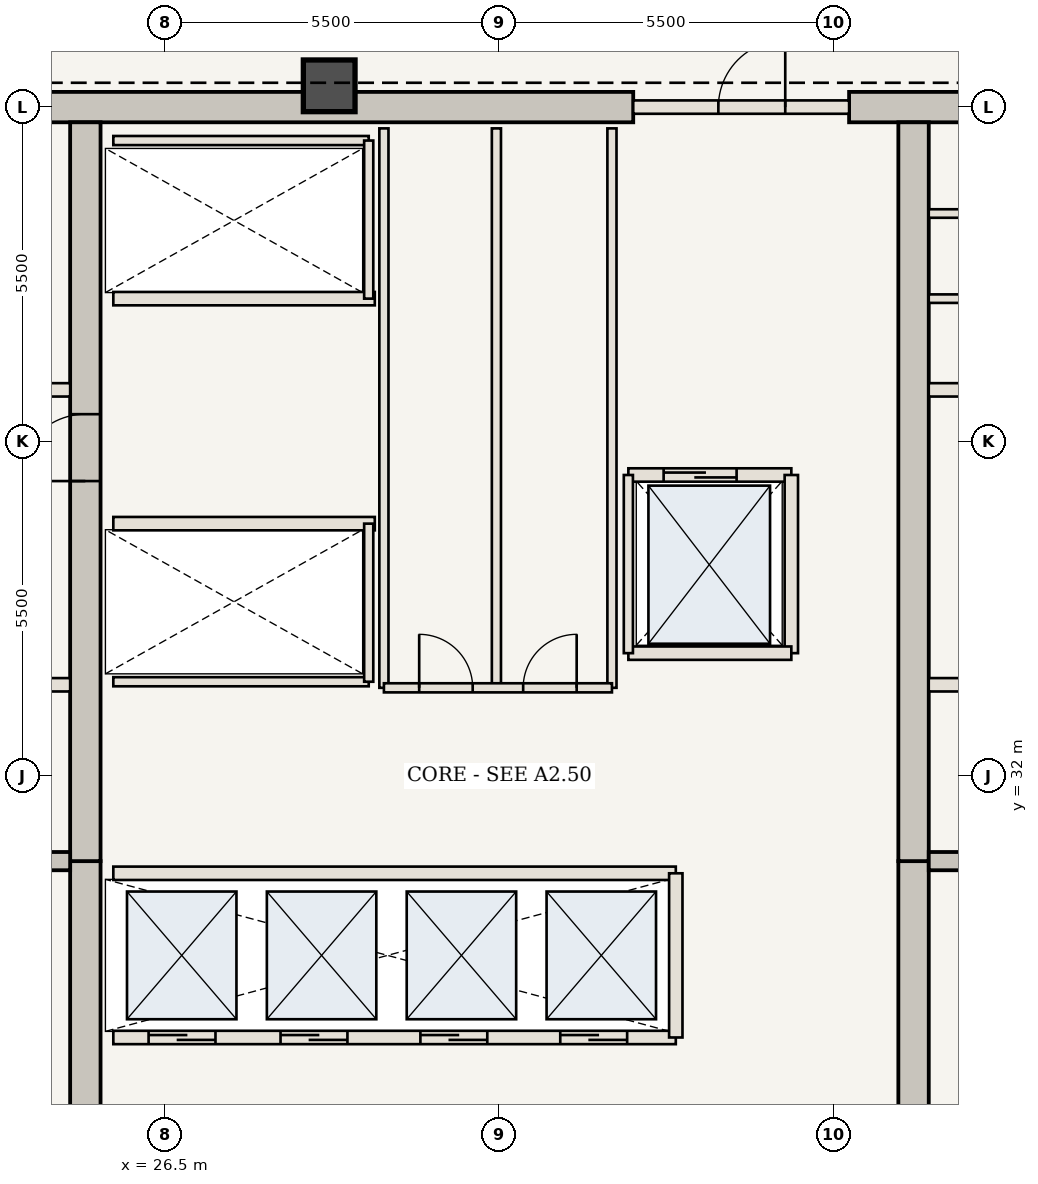
"""IFC4 building model, lengths in metres.
Left out: names, types, materials, properties, quantities, classifications, styles, units other than length and angle.
Written with IfcOpenShell. Run it as: python <this file> out.ifc"""

import sys

from ifc_helpers import new_model, si_unit, direction, frame, frame_2d, origin, origin_2d, place, context, subcontext, project, spatial, rectangle, extrude, element, fill, save


model = new_model("IFC4")
c1 = context("Model", 3, precision=1e-05, world=origin(), true_north=direction((0.0, 1.0)))
c2 = subcontext(c1, "Body", "Model", "MODEL_VIEW")
j1 = project(units=[si_unit("LENGTHUNIT", "METRE"), si_unit("PLANEANGLEUNIT", "RADIAN")], contexts=[c1])
p1 = place(None, origin())
s1 = spatial("IfcSite", under=j1, at=p1, CompositionType="ELEMENT")
p2 = place(p1, origin())
s2 = spatial("IfcBuilding", under=s1, at=p2, CompositionType="ELEMENT")
p3 = place(p2, frame((0.0, 0.0, 229.25)))
s3 = spatial("IfcBuildingStorey", under=s2, at=p3, CompositionType="ELEMENT", Elevation=229.25)
p4 = place(p3, frame((21.41, 43.0, 0.0), z_axis=(0.0, 0.0, 1.0), x_axis=(1.0, 0.0, 0.0)))
e1 = element("IfcWall", 1, at=p4, inside=s3, PredefinedType="SHEAR", context=c2, shape_type="SweptSolid", body=[
    extrude(rectangle(XDim=12.79, YDim=0.5, at=frame_2d((6.395, 0.0))), origin(), (0.0, 0.0, 1.0), 3.85),
])
p5 = place(p3, frame((37.75, 43.0, 0.0), z_axis=(0.0, 0.0, 1.0), x_axis=(1.0, 0.0, 0.0)))
e2 = element("IfcWall", 2, at=p5, inside=s3, PredefinedType="SHEAR", context=c2, shape_type="SweptSolid", body=[
    extrude(rectangle(XDim=4.84, YDim=0.5, at=frame_2d((2.42, 0.0))), origin(), (0.0, 0.0, 1.0), 3.85),
])
p6 = place(p3, frame((25.19, 21.2, 0.0), z_axis=(0.0, 0.0, 1.0), x_axis=(0.0, 1.0, 0.0)))
e3 = element("IfcWall", 3, at=p6, inside=s3, PredefinedType="SHEAR", context=c2, shape_type="SweptSolid", body=[
    extrude(rectangle(XDim=9.4, YDim=0.5, at=frame_2d((4.7, 0.0))), origin(), (0.0, 0.0, 1.0), 3.85),
])
p7 = place(p3, frame((25.19, 30.6, 0.0), z_axis=(0.0, 0.0, 1.0), x_axis=(0.0, 1.0, 0.0)))
e4 = element("IfcWall", 4, at=p7, inside=s3, PredefinedType="SHEAR", context=c2, shape_type="SweptSolid", body=[
    extrude(rectangle(XDim=12.15, YDim=0.5, at=frame_2d((6.075, 0.0))), origin(), (0.0, 0.0, 1.0), 3.85),
])
p8 = place(p7, frame((6.25, 0.0, 0.0)))
e5 = element("IfcOpeningElement", 5, at=p8, cuts=e4, PredefinedType="OPENING", context=c2, shape_type="SweptSolid", body=[
    extrude(rectangle(XDim=1.1, YDim=2.15, at=frame_2d((0.55, 1.075))), frame((0.0, 0.26, 0.0), z_axis=(0.0, -1.0, 0.0), x_axis=(1.0, 0.0, 0.0)), (0.0, 0.0, 1.0), 0.52),
])
p9 = place(p3, frame((38.81, 21.2, 0.0), z_axis=(0.0, 0.0, 1.0), x_axis=(0.0, 1.0, 0.0)))
e6 = element("IfcWall", 6, at=p9, inside=s3, PredefinedType="SHEAR", context=c2, shape_type="SweptSolid", body=[
    extrude(rectangle(XDim=9.4, YDim=0.5, at=frame_2d((4.7, 0.0))), origin(), (0.0, 0.0, 1.0), 3.85),
])
p10 = place(p3, frame((38.81, 30.6, 0.0), z_axis=(0.0, 0.0, 1.0), x_axis=(0.0, 1.0, 0.0)))
e7 = element("IfcWall", 7, at=p10, inside=s3, PredefinedType="SHEAR", context=c2, shape_type="SweptSolid", body=[
    extrude(rectangle(XDim=12.15, YDim=0.5, at=frame_2d((6.075, 0.0))), origin(), (0.0, 0.0, 1.0), 3.85),
])
p11 = place(p3, frame((29.2, 43.35, 0.0), z_axis=(0.0, 0.0, 1.0), x_axis=(1.0, 0.0, 0.0)))
e8 = element("IfcColumn", 8, at=p11, inside=s3, PredefinedType="COLUMN", context=c2, shape_type="SweptSolid", body=[
    extrude(rectangle(XDim=0.85, YDim=0.85, at=origin_2d()), origin(), (0.0, 0.0, 1.0), 3.85),
])
for number, where, z_axis, x_axis in (
    (9, (21.41, 30.6, 0.0), (0.0, 0.0, 1.0), (1.0, 0.0, 0.0)),
    (10, (39.06, 30.6, 0.0), (0.0, 0.0, 1.0), (1.0, 0.0, 0.0)),
):
    element("IfcWall", number, at=place(p3, frame(where, z_axis=z_axis, x_axis=x_axis)), inside=s3, PredefinedType="SHEAR", context=c2, shape_type="SweptSolid", body=[
        extrude(rectangle(XDim=3.53, YDim=0.3, at=frame_2d((1.765, 0.0))), origin(), (0.0, 0.0, 1.0), 3.685),
    ])
p12 = place(p3, frame((21.41, 33.5, 0.0), z_axis=(0.0, 0.0, 1.0), x_axis=(1.0, 0.0, 0.0)))
e11 = element("IfcWall", 11, at=p12, inside=s3, PredefinedType="STANDARD", context=c2, shape_type="SweptSolid", body=[
    extrude(rectangle(XDim=3.53, YDim=0.22, at=frame_2d((1.765, 0.0))), origin(), (0.0, 0.0, 1.0), 3.685),
])
p13 = place(p12, frame((0.75, 0.0, 0.0)))
e12 = element("IfcOpeningElement", 12, at=p13, cuts=e11, PredefinedType="OPENING", context=c2, shape_type="SweptSolid", body=[
    extrude(rectangle(XDim=1.2, YDim=2.2, at=frame_2d((0.6, 1.1))), frame((0.0, 0.12, 0.0), z_axis=(0.0, -1.0, 0.0), x_axis=(1.0, 0.0, 0.0)), (0.0, 0.0, 1.0), 0.24),
])
p14 = place(p3, frame((39.06, 33.5, 0.0), z_axis=(0.0, 0.0, 1.0), x_axis=(1.0, 0.0, 0.0)))
e13 = element("IfcWall", 13, at=p14, inside=s3, PredefinedType="STANDARD", context=c2, shape_type="SweptSolid", body=[
    extrude(rectangle(XDim=3.53, YDim=0.22, at=frame_2d((1.765, 0.0))), origin(), (0.0, 0.0, 1.0), 3.685),
])
p15 = place(p14, frame((1.55, 0.0, 0.0)))
e14 = element("IfcOpeningElement", 14, at=p15, cuts=e13, PredefinedType="OPENING", context=c2, shape_type="SweptSolid", body=[
    extrude(rectangle(XDim=1.2, YDim=2.2, at=frame_2d((0.6, 1.1))), frame((0.0, 0.12, 0.0), z_axis=(0.0, -1.0, 0.0), x_axis=(1.0, 0.0, 0.0)), (0.0, 0.0, 1.0), 0.24),
])
for number, where, z_axis, x_axis in (
    (15, (21.41, 38.35, 0.0), (0.0, 0.0, 1.0), (1.0, 0.0, 0.0)),
    (16, (39.06, 38.35, 0.0), (0.0, 0.0, 1.0), (1.0, 0.0, 0.0)),
):
    element("IfcWall", number, at=place(p3, frame(where, z_axis=z_axis, x_axis=x_axis)), inside=s3, PredefinedType="STANDARD", context=c2, shape_type="SweptSolid", body=[
        extrude(rectangle(XDim=3.53, YDim=0.22, at=frame_2d((1.765, 0.0))), origin(), (0.0, 0.0, 1.0), 3.685),
    ])
for number, where, z_axis, x_axis in (
    (17, (39.06, 39.85, 0.0), (0.0, 0.0, 1.0), (1.0, 0.0, 0.0)),
    (18, (39.06, 41.25, 0.0), (0.0, 0.0, 1.0), (1.0, 0.0, 0.0)),
):
    element("IfcWall", number, at=place(p3, frame(where, z_axis=z_axis, x_axis=x_axis)), inside=s3, PredefinedType="STANDARD", context=c2, shape_type="SweptSolid", body=[
        extrude(rectangle(XDim=3.53, YDim=0.14, at=frame_2d((1.765, 0.0))), origin(), (0.0, 0.0, 1.0), 3.685),
    ])
p16 = place(p3, frame((25.65, 27.7, 0.0), z_axis=(0.0, 0.0, 1.0), x_axis=(1.0, 0.0, 0.0)))
e19 = element("IfcWall", 19, at=p16, inside=s3, PredefinedType="STANDARD", context=c2, shape_type="SweptSolid", body=[
    extrude(rectangle(XDim=9.25, YDim=0.22, at=frame_2d((4.625, 0.0))), origin(), (0.0, 0.0, 1.0), 3.685),
])
p17 = place(p16, frame((0.58, 0.0, 0.0)))
e20 = element("IfcOpeningElement", 20, at=p17, cuts=e19, PredefinedType="OPENING", context=c2, shape_type="SweptSolid", body=[
    extrude(rectangle(XDim=1.1, YDim=2.15, at=frame_2d((0.55, 1.075))), frame((0.0, 0.12, 0.0), z_axis=(0.0, -1.0, 0.0), x_axis=(1.0, 0.0, 0.0)), (0.0, 0.0, 1.0), 0.24),
])
p18 = place(p16, frame((2.75, 0.0, 0.0)))
e21 = element("IfcOpeningElement", 21, at=p18, cuts=e19, PredefinedType="OPENING", context=c2, shape_type="SweptSolid", body=[
    extrude(rectangle(XDim=1.1, YDim=2.15, at=frame_2d((0.55, 1.075))), frame((0.0, 0.12, 0.0), z_axis=(0.0, -1.0, 0.0), x_axis=(1.0, 0.0, 0.0)), (0.0, 0.0, 1.0), 0.24),
])
p19 = place(p16, frame((5.05, 0.0, 0.0)))
e22 = element("IfcOpeningElement", 22, at=p19, cuts=e19, PredefinedType="OPENING", context=c2, shape_type="SweptSolid", body=[
    extrude(rectangle(XDim=1.1, YDim=2.15, at=frame_2d((0.55, 1.075))), frame((0.0, 0.12, 0.0), z_axis=(0.0, -1.0, 0.0), x_axis=(1.0, 0.0, 0.0)), (0.0, 0.0, 1.0), 0.24),
])
p20 = place(p16, frame((7.35, 0.0, 0.0)))
e23 = element("IfcOpeningElement", 23, at=p20, cuts=e19, PredefinedType="OPENING", context=c2, shape_type="SweptSolid", body=[
    extrude(rectangle(XDim=1.1, YDim=2.15, at=frame_2d((0.55, 1.075))), frame((0.0, 0.12, 0.0), z_axis=(0.0, -1.0, 0.0), x_axis=(1.0, 0.0, 0.0)), (0.0, 0.0, 1.0), 0.24),
])
p21 = place(p3, frame((25.65, 30.4, 0.0), z_axis=(0.0, 0.0, 1.0), x_axis=(1.0, 0.0, 0.0)))
e24 = element("IfcWall", 24, at=p21, inside=s3, PredefinedType="STANDARD", context=c2, shape_type="SweptSolid", body=[
    extrude(rectangle(XDim=9.25, YDim=0.22, at=frame_2d((4.625, 0.0))), origin(), (0.0, 0.0, 1.0), 3.685),
])
p22 = place(p3, frame((34.9, 27.7, 0.0), z_axis=(0.0, 0.0, 1.0), x_axis=(0.0, 1.0, 0.0)))
e25 = element("IfcWall", 25, at=p22, inside=s3, PredefinedType="STANDARD", context=c2, shape_type="SweptSolid", body=[
    extrude(rectangle(XDim=2.7, YDim=0.22, at=frame_2d((1.35, 0.0))), origin(), (0.0, 0.0, 1.0), 3.685),
])
p23 = place(p3, frame((25.65, 36.15, 0.0), z_axis=(0.0, 0.0, 1.0), x_axis=(1.0, 0.0, 0.0)))
e26 = element("IfcWall", 26, at=p23, inside=s3, PredefinedType="STANDARD", context=c2, shape_type="SweptSolid", body=[
    extrude(rectangle(XDim=4.3, YDim=0.22, at=frame_2d((2.15, 0.0))), origin(), (0.0, 0.0, 1.0), 3.685),
])
p24 = place(p3, frame((25.65, 33.55, 0.0), z_axis=(0.0, 0.0, 1.0), x_axis=(1.0, 0.0, 0.0)))
e27 = element("IfcWall", 27, at=p24, inside=s3, PredefinedType="STANDARD", context=c2, shape_type="SweptSolid", body=[
    extrude(rectangle(XDim=4.2, YDim=0.15, at=frame_2d((2.1, 0.0))), origin(), (0.0, 0.0, 1.0), 3.685),
])
p25 = place(p3, frame((29.85, 33.55, 0.0), z_axis=(0.0, 0.0, 1.0), x_axis=(0.0, 1.0, 0.0)))
e28 = element("IfcWall", 28, at=p25, inside=s3, PredefinedType="STANDARD", context=c2, shape_type="SweptSolid", body=[
    extrude(rectangle(XDim=2.6, YDim=0.15, at=frame_2d((1.3, 0.0))), origin(), (0.0, 0.0, 1.0), 3.685),
])
p26 = place(p3, frame((25.65, 39.85, 0.0), z_axis=(0.0, 0.0, 1.0), x_axis=(1.0, 0.0, 0.0)))
e29 = element("IfcWall", 29, at=p26, inside=s3, PredefinedType="STANDARD", context=c2, shape_type="SweptSolid", body=[
    extrude(rectangle(XDim=4.3, YDim=0.22, at=frame_2d((2.15, 0.0))), origin(), (0.0, 0.0, 1.0), 3.685),
])
p27 = place(p3, frame((25.65, 42.45, 0.0), z_axis=(0.0, 0.0, 1.0), x_axis=(1.0, 0.0, 0.0)))
e30 = element("IfcWall", 30, at=p27, inside=s3, PredefinedType="STANDARD", context=c2, shape_type="SweptSolid", body=[
    extrude(rectangle(XDim=4.2, YDim=0.15, at=frame_2d((2.1, 0.0))), origin(), (0.0, 0.0, 1.0), 3.685),
])
p28 = place(p3, frame((29.85, 39.85, 0.0), z_axis=(0.0, 0.0, 1.0), x_axis=(0.0, 1.0, 0.0)))
e31 = element("IfcWall", 31, at=p28, inside=s3, PredefinedType="STANDARD", context=c2, shape_type="SweptSolid", body=[
    extrude(rectangle(XDim=2.6, YDim=0.15, at=frame_2d((1.3, 0.0))), origin(), (0.0, 0.0, 1.0), 3.685),
])
for number, where, z_axis, x_axis in (
    (32, (30.1, 33.45, 0.0), (0.0, 0.0, 1.0), (0.0, 1.0, 0.0)),
    (33, (31.95, 33.45, 0.0), (0.0, 0.0, 1.0), (0.0, 1.0, 0.0)),
    (34, (33.85, 33.45, 0.0), (0.0, 0.0, 1.0), (0.0, 1.0, 0.0)),
):
    element("IfcWall", number, at=place(p3, frame(where, z_axis=z_axis, x_axis=x_axis)), inside=s3, PredefinedType="STANDARD", context=c2, shape_type="SweptSolid", body=[
        extrude(rectangle(XDim=9.2, YDim=0.15, at=frame_2d((4.6, 0.0))), origin(), (0.0, 0.0, 1.0), 3.685),
    ])
p29 = place(p3, frame((30.1, 33.45, 0.0), z_axis=(0.0, 0.0, 1.0), x_axis=(1.0, 0.0, 0.0)))
e35 = element("IfcWall", 35, at=p29, inside=s3, PredefinedType="STANDARD", context=c2, shape_type="SweptSolid", body=[
    extrude(rectangle(XDim=3.75, YDim=0.15, at=frame_2d((1.875, 0.0))), origin(), (0.0, 0.0, 1.0), 3.685),
])
p30 = place(p29, frame((0.58, 0.0, 0.0)))
e36 = element("IfcOpeningElement", 36, at=p30, cuts=e35, PredefinedType="OPENING", context=c2, shape_type="SweptSolid", body=[
    extrude(rectangle(XDim=0.88, YDim=2.1, at=frame_2d((0.44, 1.05))), frame((0.0, 0.085, 0.0), z_axis=(0.0, -1.0, 0.0), x_axis=(1.0, 0.0, 0.0)), (0.0, 0.0, 1.0), 0.17),
])
p31 = place(p29, frame((2.29, 0.0, 0.0)))
e37 = element("IfcOpeningElement", 37, at=p31, cuts=e35, PredefinedType="OPENING", context=c2, shape_type="SweptSolid", body=[
    extrude(rectangle(XDim=0.88, YDim=2.1, at=frame_2d((0.44, 1.05))), frame((0.0, 0.085, 0.0), z_axis=(0.0, -1.0, 0.0), x_axis=(1.0, 0.0, 0.0)), (0.0, 0.0, 1.0), 0.17),
])
p32 = place(p3, frame((34.2, 43.0, 0.0), z_axis=(0.0, 0.0, 1.0), x_axis=(1.0, 0.0, 0.0)))
e38 = element("IfcWall", 38, at=p32, inside=s3, PredefinedType="STANDARD", context=c2, shape_type="SweptSolid", body=[
    extrude(rectangle(XDim=3.55, YDim=0.22, at=frame_2d((1.775, 0.0))), origin(), (0.0, 0.0, 1.0), 3.685),
])
p33 = place(p32, frame((1.4, 0.0, 0.0)))
e39 = element("IfcOpeningElement", 39, at=p33, cuts=e38, PredefinedType="OPENING", context=c2, shape_type="SweptSolid", body=[
    extrude(rectangle(XDim=1.1, YDim=2.15, at=frame_2d((0.55, 1.075))), frame((0.0, 0.12, 0.0), z_axis=(0.0, -1.0, 0.0), x_axis=(1.0, 0.0, 0.0)), (0.0, 0.0, 1.0), 0.24),
])
p34 = place(p3, frame((34.12, 36.95, 0.0), z_axis=(0.0, 0.0, 1.0), x_axis=(1.0, 0.0, 0.0)))
e40 = element("IfcWall", 40, at=p34, inside=s3, PredefinedType="STANDARD", context=c2, shape_type="SweptSolid", body=[
    extrude(rectangle(XDim=2.68, YDim=0.22, at=frame_2d((1.34, 0.0))), origin(), (0.0, 0.0, 1.0), 3.685),
])
p35 = place(p34, frame((0.58, 0.0, 0.0)))
e41 = element("IfcOpeningElement", 41, at=p35, cuts=e40, PredefinedType="OPENING", context=c2, shape_type="SweptSolid", body=[
    extrude(rectangle(XDim=1.2, YDim=2.2, at=frame_2d((0.6, 1.1))), frame((0.0, 0.12, 0.0), z_axis=(0.0, -1.0, 0.0), x_axis=(1.0, 0.0, 0.0)), (0.0, 0.0, 1.0), 0.24),
])
p36 = place(p3, frame((36.8, 34.02, 0.0), z_axis=(0.0, 0.0, 1.0), x_axis=(0.0, 1.0, 0.0)))
e42 = element("IfcWall", 42, at=p36, inside=s3, PredefinedType="STANDARD", context=c2, shape_type="SweptSolid", body=[
    extrude(rectangle(XDim=2.93, YDim=0.22, at=frame_2d((1.465, 0.0))), origin(), (0.0, 0.0, 1.0), 3.685),
])
p37 = place(p3, frame((34.12, 34.02, 0.0), z_axis=(0.0, 0.0, 1.0), x_axis=(1.0, 0.0, 0.0)))
e43 = element("IfcWall", 43, at=p37, inside=s3, PredefinedType="STANDARD", context=c2, shape_type="SweptSolid", body=[
    extrude(rectangle(XDim=2.68, YDim=0.22, at=frame_2d((1.34, 0.0))), origin(), (0.0, 0.0, 1.0), 3.685),
])
p38 = place(p3, frame((34.12, 34.02, 0.0), z_axis=(0.0, 0.0, 1.0), x_axis=(0.0, 1.0, 0.0)))
e44 = element("IfcWall", 44, at=p38, inside=s3, PredefinedType="STANDARD", context=c2, shape_type="SweptSolid", body=[
    extrude(rectangle(XDim=2.93, YDim=0.15, at=frame_2d((1.465, 0.0))), origin(), (0.0, 0.0, 1.0), 3.685),
])
p39 = place(p8, origin())
e45 = element("IfcDoor", 45, at=p39, inside=s3, OperationType="SINGLE_SWING_LEFT", PredefinedType="DOOR", context=c2, shape_type="SweptSolid", body=[
    extrude(rectangle(XDim=1.1, YDim=2.15, at=frame_2d((0.55, 1.075))), frame((0.0, 0.025, 0.0), z_axis=(0.0, -1.0, 0.0), x_axis=(1.0, 0.0, 0.0)), (0.0, 0.0, 1.0), 0.05),
])
fill(e5, e45)
p40 = place(p17, origin())
e46 = element("IfcDoor", 46, at=p40, inside=s3, OperationType="DOUBLE_DOOR_SLIDING", PredefinedType="DOOR", context=c2, shape_type="SweptSolid", body=[
    extrude(rectangle(XDim=1.1, YDim=2.15, at=frame_2d((0.55, 1.075))), frame((0.0, 0.025, 0.0), z_axis=(0.0, -1.0, 0.0), x_axis=(1.0, 0.0, 0.0)), (0.0, 0.0, 1.0), 0.05),
])
fill(e20, e46)
p41 = place(p18, origin())
e47 = element("IfcDoor", 47, at=p41, inside=s3, OperationType="DOUBLE_DOOR_SLIDING", PredefinedType="DOOR", context=c2, shape_type="SweptSolid", body=[
    extrude(rectangle(XDim=1.1, YDim=2.15, at=frame_2d((0.55, 1.075))), frame((0.0, 0.025, 0.0), z_axis=(0.0, -1.0, 0.0), x_axis=(1.0, 0.0, 0.0)), (0.0, 0.0, 1.0), 0.05),
])
fill(e21, e47)
p42 = place(p19, origin())
e48 = element("IfcDoor", 48, at=p42, inside=s3, OperationType="DOUBLE_DOOR_SLIDING", PredefinedType="DOOR", context=c2, shape_type="SweptSolid", body=[
    extrude(rectangle(XDim=1.1, YDim=2.15, at=frame_2d((0.55, 1.075))), frame((0.0, 0.025, 0.0), z_axis=(0.0, -1.0, 0.0), x_axis=(1.0, 0.0, 0.0)), (0.0, 0.0, 1.0), 0.05),
])
fill(e22, e48)
p43 = place(p20, origin())
e49 = element("IfcDoor", 49, at=p43, inside=s3, OperationType="DOUBLE_DOOR_SLIDING", PredefinedType="DOOR", context=c2, shape_type="SweptSolid", body=[
    extrude(rectangle(XDim=1.1, YDim=2.15, at=frame_2d((0.55, 1.075))), frame((0.0, 0.025, 0.0), z_axis=(0.0, -1.0, 0.0), x_axis=(1.0, 0.0, 0.0)), (0.0, 0.0, 1.0), 0.05),
])
fill(e23, e49)
p44 = place(p30, origin())
e50 = element("IfcDoor", 50, at=p44, inside=s3, OperationType="SINGLE_SWING_LEFT", PredefinedType="DOOR", context=c2, shape_type="SweptSolid", body=[
    extrude(rectangle(XDim=0.88, YDim=2.1, at=frame_2d((0.44, 1.05))), frame((0.0, 0.025, 0.0), z_axis=(0.0, -1.0, 0.0), x_axis=(1.0, 0.0, 0.0)), (0.0, 0.0, 1.0), 0.05),
])
fill(e36, e50)
p45 = place(p31, origin())
e51 = element("IfcDoor", 51, at=p45, inside=s3, OperationType="SINGLE_SWING_RIGHT", PredefinedType="DOOR", context=c2, shape_type="SweptSolid", body=[
    extrude(rectangle(XDim=0.88, YDim=2.1, at=frame_2d((0.44, 1.05))), frame((0.0, 0.025, 0.0), z_axis=(0.0, -1.0, 0.0), x_axis=(1.0, 0.0, 0.0)), (0.0, 0.0, 1.0), 0.05),
])
fill(e37, e51)
p46 = place(p33, origin())
e52 = element("IfcDoor", 52, at=p46, inside=s3, OperationType="SINGLE_SWING_RIGHT", PredefinedType="DOOR", context=c2, shape_type="SweptSolid", body=[
    extrude(rectangle(XDim=1.1, YDim=2.15, at=frame_2d((0.55, 1.075))), frame((0.0, 0.025, 0.0), z_axis=(0.0, -1.0, 0.0), x_axis=(1.0, 0.0, 0.0)), (0.0, 0.0, 1.0), 0.05),
])
fill(e39, e52)
p47 = place(p35, origin())
e53 = element("IfcDoor", 53, at=p47, inside=s3, OperationType="DOUBLE_DOOR_SLIDING", PredefinedType="DOOR", context=c2, shape_type="SweptSolid", body=[
    extrude(rectangle(XDim=1.2, YDim=2.2, at=frame_2d((0.6, 1.1))), frame((0.0, 0.025, 0.0), z_axis=(0.0, -1.0, 0.0), x_axis=(1.0, 0.0, 0.0)), (0.0, 0.0, 1.0), 0.05),
])
fill(e41, e53)
save(model, sys.argv[1])
